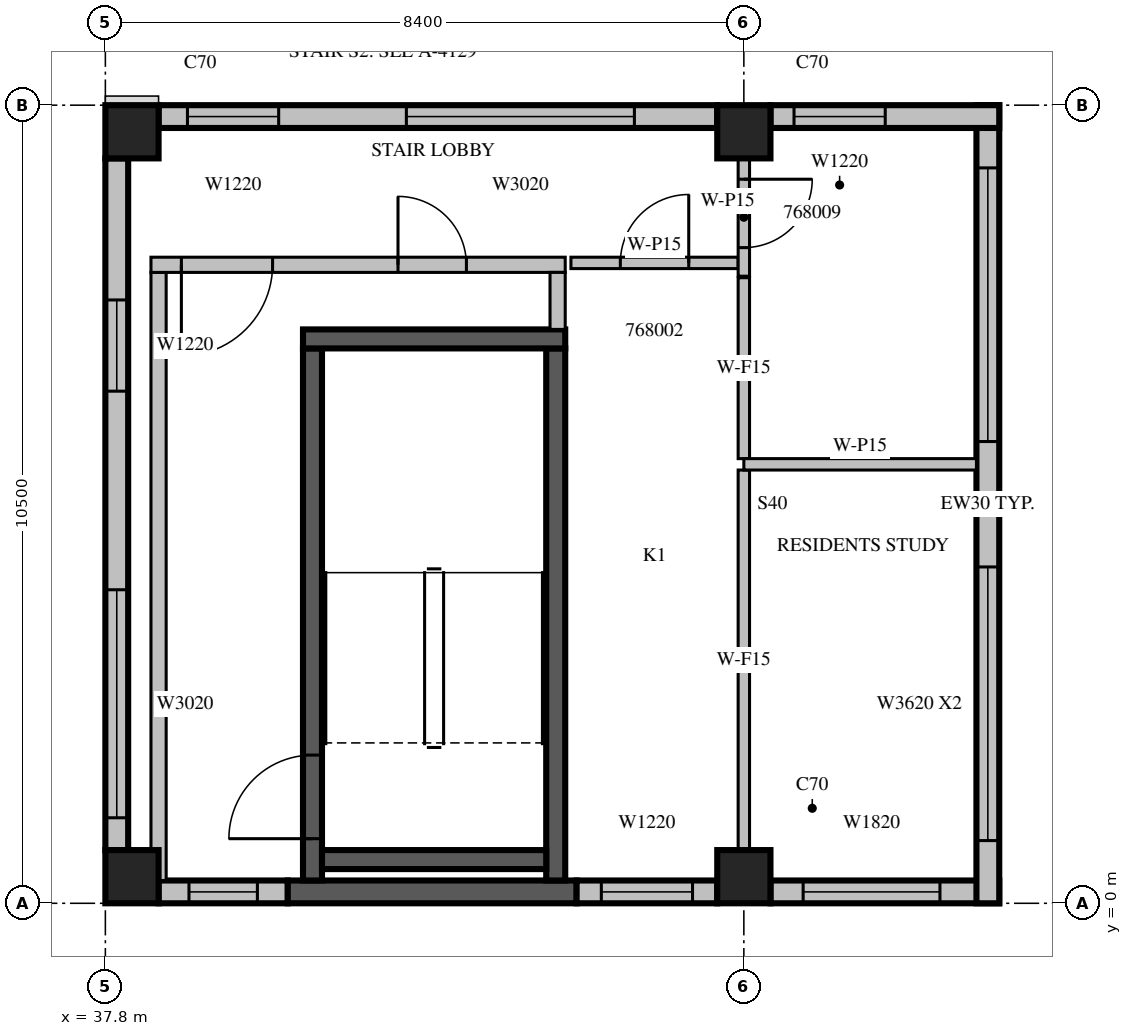
"""IFC4 building model, lengths in metres.
Left out: names, types, materials, properties, quantities, classifications, styles, units other than length and angle.
Written with IfcOpenShell. Run it as: python <this file> out.ifc"""

import sys

from ifc_helpers import new_model, si_unit, direction, frame, frame_2d, origin, origin_2d, place, context, subcontext, project, spatial, rectangle, extrude, source, transform, mapped, element, fill, save


model = new_model("IFC4")
c1 = context("Model", 3, precision=1e-05, world=origin(), true_north=direction((0.0, 1.0)))
c2 = subcontext(c1, "Body", "Model", "MODEL_VIEW")
j1 = project(units=[si_unit("LENGTHUNIT", "METRE"), si_unit("PLANEANGLEUNIT", "RADIAN")], contexts=[c1])
p1 = place(None, origin())
s1 = spatial("IfcSite", under=j1, at=p1, CompositionType="ELEMENT")
p2 = place(p1, origin())
s2 = spatial("IfcBuilding", under=s1, at=p2, CompositionType="ELEMENT")
p3 = place(p2, frame((0.0, 0.0, 298.5)))
s3 = spatial("IfcBuildingStorey", under=s2, at=p3, CompositionType="ELEMENT", Elevation=298.5)
m1 = source(origin(), c2, "Body", "SweptSolid", [
    extrude(rectangle(XDim=0.7, YDim=0.7, at=origin_2d()), origin(), (0.0, 0.0, 1.0), 3.5),
])
for number, where, z_axis, x_axis in (
    (1, (38.15, 0.35, 0.0), (0.0, 0.0, 1.0), (1.0, 0.0, 0.0)),
    (2, (46.2, 0.35, 0.0), (0.0, 0.0, 1.0), (1.0, 0.0, 0.0)),
    (3, (38.15, 10.15, 0.0), (0.0, 0.0, 1.0), (1.0, 0.0, 0.0)),
    (4, (46.2, 10.15, 0.0), (0.0, 0.0, 1.0), (1.0, 0.0, 0.0)),
):
    element("IfcColumn", number, at=place(p3, frame(where, z_axis=z_axis, x_axis=x_axis)), inside=s3, PredefinedType="COLUMN", context=c2, shape_type="MappedRepresentation", body=[
        mapped(m1, transform((0.0, 0.0, 0.0), scale=1.0)),
    ])
m2 = source(origin(), c2, "Body", "SweptSolid", [
    extrude(rectangle(XDim=1.7, YDim=0.3, at=frame_2d((0.85, 0.0))), origin(), (0.0, 0.0, 1.0), 3.1),
])
p4 = place(p3, frame((38.5, 0.15, 0.0), z_axis=(0.0, 0.0, 1.0), x_axis=(1.0, 0.0, 0.0)))
e5 = element("IfcWall", 5, at=p4, inside=s3, PredefinedType="STANDARD", context=c2, shape_type="MappedRepresentation", body=[
    mapped(m2, transform((0.0, 0.0, 0.0), scale=1.0)),
])
m3 = source(origin(), c2, "Body", "SweptSolid", [
    extrude(rectangle(XDim=0.9, YDim=2.0, at=frame_2d((0.45, 1.0))), frame((0.0, 0.16, 0.0), z_axis=(0.0, -1.0, 0.0), x_axis=(1.0, 0.0, 0.0)), (0.0, 0.0, 1.0), 0.32),
])
p5 = place(p4, frame((0.4, 0.0, 0.6)))
e6 = element("IfcOpeningElement", 6, at=p5, cuts=e5, PredefinedType="OPENING", context=c2, shape_type="MappedRepresentation", body=[
    mapped(m3, transform((0.0, 0.0, 0.0), scale=1.0)),
])
m4 = source(origin(), c2, "Body", "SweptSolid", [
    extrude(rectangle(XDim=3.8, YDim=0.3, at=frame_2d((1.9, 0.0))), origin(), (0.0, 0.0, 1.0), 3.1),
])
p6 = place(p3, frame((40.2, 0.15, 0.0), z_axis=(0.0, 0.0, 1.0), x_axis=(1.0, 0.0, 0.0)))
e7 = element("IfcWall", 7, at=p6, inside=s3, PredefinedType="SOLIDWALL", context=c2, shape_type="MappedRepresentation", body=[
    mapped(m4, transform((0.0, 0.0, 0.0), scale=1.0)),
])
m5 = source(origin(), c2, "Body", "SweptSolid", [
    extrude(rectangle(XDim=1.85, YDim=0.3, at=frame_2d((0.925, 0.0))), origin(), (0.0, 0.0, 1.0), 3.1),
])
p7 = place(p3, frame((44.0, 0.15, 0.0), z_axis=(0.0, 0.0, 1.0), x_axis=(1.0, 0.0, 0.0)))
e8 = element("IfcWall", 8, at=p7, inside=s3, PredefinedType="STANDARD", context=c2, shape_type="MappedRepresentation", body=[
    mapped(m5, transform((0.0, 0.0, 0.0), scale=1.0)),
])
m6 = source(origin(), c2, "Body", "SweptSolid", [
    extrude(rectangle(XDim=1.2, YDim=2.0, at=frame_2d((0.6, 1.0))), frame((0.0, 0.16, 0.0), z_axis=(0.0, -1.0, 0.0), x_axis=(1.0, 0.0, 0.0)), (0.0, 0.0, 1.0), 0.32),
])
p8 = place(p7, frame((0.325, 0.0, 0.6)))
e9 = element("IfcOpeningElement", 9, at=p8, cuts=e8, PredefinedType="OPENING", context=c2, shape_type="MappedRepresentation", body=[
    mapped(m6, transform((0.0, 0.0, 0.0), scale=1.0)),
])
m7 = source(origin(), c2, "Body", "SweptSolid", [
    extrude(rectangle(XDim=3.01, YDim=0.3, at=frame_2d((1.505, 0.0))), origin(), (0.0, 0.0, 1.0), 3.1),
])
p9 = place(p3, frame((46.55, 0.15, 0.0), z_axis=(0.0, 0.0, 1.0), x_axis=(1.0, 0.0, 0.0)))
e10 = element("IfcWall", 10, at=p9, inside=s3, PredefinedType="STANDARD", context=c2, shape_type="MappedRepresentation", body=[
    mapped(m7, transform((0.0, 0.0, 0.0), scale=1.0)),
])
m8 = source(origin(), c2, "Body", "SweptSolid", [
    extrude(rectangle(XDim=1.8, YDim=2.0, at=frame_2d((0.9, 1.0))), frame((0.0, 0.16, 0.0), z_axis=(0.0, -1.0, 0.0), x_axis=(1.0, 0.0, 0.0)), (0.0, 0.0, 1.0), 0.32),
])
p10 = place(p9, frame((0.43, 0.0, 0.6)))
e11 = element("IfcOpeningElement", 11, at=p10, cuts=e10, PredefinedType="OPENING", context=c2, shape_type="MappedRepresentation", body=[
    mapped(m8, transform((0.0, 0.0, 0.0), scale=1.0)),
])
m9 = source(origin(), c2, "Body", "SweptSolid", [
    extrude(rectangle(XDim=10.5, YDim=0.3, at=frame_2d((5.25, 0.0))), origin(), (0.0, 0.0, 1.0), 3.1),
])
p11 = place(p3, frame((49.41, 0.0, 0.0), z_axis=(0.0, 0.0, 1.0), x_axis=(0.0, 1.0, 0.0)))
e12 = element("IfcWall", 12, at=p11, inside=s3, PredefinedType="STANDARD", context=c2, shape_type="MappedRepresentation", body=[
    mapped(m9, transform((0.0, 0.0, 0.0), scale=1.0)),
])
m10 = source(origin(), c2, "Body", "SweptSolid", [
    extrude(rectangle(XDim=3.6, YDim=2.0, at=frame_2d((1.8, 1.0))), frame((0.0, 0.16, 0.0), z_axis=(0.0, -1.0, 0.0), x_axis=(1.0, 0.0, 0.0)), (0.0, 0.0, 1.0), 0.32),
])
p12 = place(p11, frame((0.825, 0.0, 0.6)))
e13 = element("IfcOpeningElement", 13, at=p12, cuts=e12, PredefinedType="OPENING", context=c2, shape_type="MappedRepresentation", body=[
    mapped(m10, transform((0.0, 0.0, 0.0), scale=1.0)),
])
p13 = place(p11, frame((6.075, 0.0, 0.6)))
e14 = element("IfcOpeningElement", 14, at=p13, cuts=e12, PredefinedType="OPENING", context=c2, shape_type="MappedRepresentation", body=[
    mapped(m10, transform((0.0, 0.0, 0.0), scale=1.0)),
])
p14 = place(p3, frame((49.56, 10.35, 0.0), z_axis=(0.0, 0.0, 1.0), x_axis=(-1.0, 0.0, 0.0)))
e15 = element("IfcWall", 15, at=p14, inside=s3, PredefinedType="STANDARD", context=c2, shape_type="MappedRepresentation", body=[
    mapped(m7, transform((0.0, 0.0, 0.0), scale=1.0)),
])
p15 = place(p14, frame((1.5, 0.0, 0.6)))
e16 = element("IfcOpeningElement", 16, at=p15, cuts=e15, PredefinedType="OPENING", context=c2, shape_type="MappedRepresentation", body=[
    mapped(m6, transform((0.0, 0.0, 0.0), scale=1.0)),
])
m11 = source(origin(), c2, "Body", "SweptSolid", [
    extrude(rectangle(XDim=7.35, YDim=0.3, at=frame_2d((3.675, 0.0))), origin(), (0.0, 0.0, 1.0), 3.1),
])
p16 = place(p3, frame((45.85, 10.35, 0.0), z_axis=(0.0, 0.0, 1.0), x_axis=(-1.0, 0.0, 0.0)))
e17 = element("IfcWall", 17, at=p16, inside=s3, PredefinedType="STANDARD", context=c2, shape_type="MappedRepresentation", body=[
    mapped(m11, transform((0.0, 0.0, 0.0), scale=1.0)),
])
m12 = source(origin(), c2, "Body", "SweptSolid", [
    extrude(rectangle(XDim=3.0, YDim=2.0, at=frame_2d((1.5, 1.0))), frame((0.0, 0.16, 0.0), z_axis=(0.0, -1.0, 0.0), x_axis=(1.0, 0.0, 0.0)), (0.0, 0.0, 1.0), 0.32),
])
p17 = place(p16, frame((1.09, 0.0, 0.6)))
e18 = element("IfcOpeningElement", 18, at=p17, cuts=e17, PredefinedType="OPENING", context=c2, shape_type="MappedRepresentation", body=[
    mapped(m12, transform((0.0, 0.0, 0.0), scale=1.0)),
])
p18 = place(p16, frame((5.77, 0.0, 0.6)))
e19 = element("IfcOpeningElement", 19, at=p18, cuts=e17, PredefinedType="OPENING", context=c2, shape_type="MappedRepresentation", body=[
    mapped(m6, transform((0.0, 0.0, 0.0), scale=1.0)),
])
m13 = source(origin(), c2, "Body", "SweptSolid", [
    extrude(rectangle(XDim=9.1, YDim=0.3, at=frame_2d((4.55, 0.0))), origin(), (0.0, 0.0, 1.0), 3.1),
])
p19 = place(p3, frame((37.95, 9.8, 0.0), z_axis=(0.0, 0.0, 1.0), x_axis=(0.0, -1.0, 0.0)))
e20 = element("IfcWall", 20, at=p19, inside=s3, PredefinedType="STANDARD", context=c2, shape_type="MappedRepresentation", body=[
    mapped(m13, transform((0.0, 0.0, 0.0), scale=1.0)),
])
p20 = place(p19, frame((1.863, 0.0, 0.6)))
e21 = element("IfcOpeningElement", 21, at=p20, cuts=e20, PredefinedType="OPENING", context=c2, shape_type="MappedRepresentation", body=[
    mapped(m6, transform((0.0, 0.0, 0.0), scale=1.0)),
])
p21 = place(p19, frame((5.675, 0.0, 0.6)))
e22 = element("IfcOpeningElement", 22, at=p21, cuts=e20, PredefinedType="OPENING", context=c2, shape_type="MappedRepresentation", body=[
    mapped(m12, transform((0.0, 0.0, 0.0), scale=1.0)),
])
m14 = source(origin(), c2, "Body", "SweptSolid", [
    extrude(rectangle(XDim=7.0, YDim=0.25, at=frame_2d((3.5, 0.0))), origin(), (0.0, 0.0, 1.0), 3.1),
])
p22 = place(p3, frame((40.525, 0.3, 0.0), z_axis=(0.0, 0.0, 1.0), x_axis=(0.0, 1.0, 0.0)))
e23 = element("IfcWall", 23, at=p22, inside=s3, PredefinedType="SOLIDWALL", context=c2, shape_type="MappedRepresentation", body=[
    mapped(m14, transform((0.0, 0.0, 0.0), scale=1.0)),
])
m15 = source(origin(), c2, "Body", "SweptSolid", [
    extrude(rectangle(XDim=1.1, YDim=2.1, at=frame_2d((0.55, 1.05))), frame((0.0, 0.135, 0.0), z_axis=(0.0, -1.0, 0.0), x_axis=(1.0, 0.0, 0.0)), (0.0, 0.0, 1.0), 0.27),
])
p23 = place(p22, frame((0.55, 0.0, 0.0)))
e24 = element("IfcOpeningElement", 24, at=p23, cuts=e23, PredefinedType="OPENING", context=c2, shape_type="MappedRepresentation", body=[
    mapped(m15, transform((0.0, 0.0, 0.0), scale=1.0)),
])
p24 = place(p3, frame((43.725, 0.3, 0.0), z_axis=(0.0, 0.0, 1.0), x_axis=(0.0, 1.0, 0.0)))
e25 = element("IfcWall", 25, at=p24, inside=s3, PredefinedType="SOLIDWALL", context=c2, shape_type="MappedRepresentation", body=[
    mapped(m14, transform((0.0, 0.0, 0.0), scale=1.0)),
])
m16 = source(origin(), c2, "Body", "SweptSolid", [
    extrude(rectangle(XDim=3.45, YDim=0.25, at=frame_2d((1.725, 0.0))), origin(), (0.0, 0.0, 1.0), 3.1),
])
p25 = place(p3, frame((40.4, 7.425, 0.0), z_axis=(0.0, 0.0, 1.0), x_axis=(1.0, 0.0, 0.0)))
e26 = element("IfcWall", 26, at=p25, inside=s3, PredefinedType="SOLIDWALL", context=c2, shape_type="MappedRepresentation", body=[
    mapped(m16, transform((0.0, 0.0, 0.0), scale=1.0)),
])
m17 = source(origin(), c2, "Body", "SweptSolid", [
    extrude(rectangle(XDim=2.95, YDim=0.25, at=frame_2d((1.475, 0.0))), origin(), (0.0, 0.0, 1.0), 3.1),
])
p26 = place(p3, frame((40.65, 0.575, 0.0), z_axis=(0.0, 0.0, 1.0), x_axis=(1.0, 0.0, 0.0)))
e27 = element("IfcWall", 27, at=p26, inside=s3, PredefinedType="SOLIDWALL", context=c2, shape_type="MappedRepresentation", body=[
    mapped(m17, transform((0.0, 0.0, 0.0), scale=1.0)),
])
m18 = source(origin(), c2, "Body", "SweptSolid", [
    extrude(rectangle(XDim=8.0, YDim=0.2, at=frame_2d((4.0, 0.0))), origin(), (0.0, 0.0, 1.0), 3.1),
])
p27 = place(p3, frame((38.5, 0.3, 0.0), z_axis=(0.0, 0.0, 1.0), x_axis=(0.0, 1.0, 0.0)))
e28 = element("IfcWall", 28, at=p27, inside=s3, PredefinedType="PARTITIONING", context=c2, shape_type="MappedRepresentation", body=[
    mapped(m18, transform((0.0, 0.0, 0.0), scale=1.0)),
])
m19 = source(origin(), c2, "Body", "SweptSolid", [
    extrude(rectangle(XDim=5.45, YDim=0.2, at=frame_2d((2.725, 0.0))), origin(), (0.0, 0.0, 1.0), 3.1),
])
p28 = place(p3, frame((38.4, 8.4, 0.0), z_axis=(0.0, 0.0, 1.0), x_axis=(1.0, 0.0, 0.0)))
e29 = element("IfcWall", 29, at=p28, inside=s3, PredefinedType="PARTITIONING", context=c2, shape_type="MappedRepresentation", body=[
    mapped(m19, transform((0.0, 0.0, 0.0), scale=1.0)),
])
m20 = source(origin(), c2, "Body", "SweptSolid", [
    extrude(rectangle(XDim=1.2, YDim=2.1, at=frame_2d((0.6, 1.05))), frame((0.0, 0.11, 0.0), z_axis=(0.0, -1.0, 0.0), x_axis=(1.0, 0.0, 0.0)), (0.0, 0.0, 1.0), 0.22),
])
p29 = place(p28, frame((0.4, 0.0, 0.0)))
e30 = element("IfcOpeningElement", 30, at=p29, cuts=e29, PredefinedType="OPENING", context=c2, shape_type="MappedRepresentation", body=[
    mapped(m20, transform((0.0, 0.0, 0.0), scale=1.0)),
])
m21 = source(origin(), c2, "Body", "SweptSolid", [
    extrude(rectangle(XDim=0.9, YDim=2.1, at=frame_2d((0.45, 1.05))), frame((0.0, 0.11, 0.0), z_axis=(0.0, -1.0, 0.0), x_axis=(1.0, 0.0, 0.0)), (0.0, 0.0, 1.0), 0.22),
])
p30 = place(p28, frame((3.25, 0.0, 0.0)))
e31 = element("IfcOpeningElement", 31, at=p30, cuts=e29, PredefinedType="OPENING", context=c2, shape_type="MappedRepresentation", body=[
    mapped(m21, transform((0.0, 0.0, 0.0), scale=1.0)),
])
m22 = source(origin(), c2, "Body", "SweptSolid", [
    extrude(rectangle(XDim=0.75, YDim=0.2, at=frame_2d((0.375, 0.0))), origin(), (0.0, 0.0, 1.0), 3.1),
])
p31 = place(p3, frame((43.75, 7.55, 0.0), z_axis=(0.0, 0.0, 1.0), x_axis=(0.0, 1.0, 0.0)))
e32 = element("IfcWall", 32, at=p31, inside=s3, PredefinedType="PARTITIONING", context=c2, shape_type="MappedRepresentation", body=[
    mapped(m22, transform((0.0, 0.0, 0.0), scale=1.0)),
])
m23 = source(origin(), c2, "Body", "SweptSolid", [
    extrude(rectangle(XDim=2.2, YDim=0.15, at=frame_2d((1.1, 0.0))), origin(), (0.0, 0.0, 1.0), 3.1),
])
p32 = place(p3, frame((46.125, 8.425, 0.0), z_axis=(0.0, 0.0, 1.0), x_axis=(-1.0, 0.0, 0.0)))
e33 = element("IfcWall", 33, at=p32, inside=s3, PredefinedType="PARTITIONING", context=c2, shape_type="MappedRepresentation", body=[
    mapped(m23, transform((0.0, 0.0, 0.0), scale=1.0)),
])
m24 = source(origin(), c2, "Body", "SweptSolid", [
    extrude(rectangle(XDim=0.9, YDim=2.1, at=frame_2d((0.45, 1.05))), frame((0.0, 0.085, 0.0), z_axis=(0.0, -1.0, 0.0), x_axis=(1.0, 0.0, 0.0)), (0.0, 0.0, 1.0), 0.17),
])
p33 = place(p32, frame((0.65, 0.0, 0.0)))
e34 = element("IfcOpeningElement", 34, at=p33, cuts=e33, PredefinedType="OPENING", context=c2, shape_type="MappedRepresentation", body=[
    mapped(m24, transform((0.0, 0.0, 0.0), scale=1.0)),
])
m25 = source(origin(), c2, "Body", "SweptSolid", [
    extrude(rectangle(XDim=1.551, YDim=0.15, at=frame_2d((0.775, 0.0))), origin(), (0.0, 0.0, 1.0), 3.1),
])
p34 = place(p3, frame((46.2, 9.801, 0.0), z_axis=(0.0, 0.0, 1.0), x_axis=(0.0, -1.0, 0.0)))
e35 = element("IfcWall", 35, at=p34, inside=s3, PredefinedType="PARTITIONING", context=c2, shape_type="MappedRepresentation", body=[
    mapped(m25, transform((0.0, 0.0, 0.0), scale=1.0)),
])
p35 = place(p34, frame((0.275, 0.0, 0.0)))
e36 = element("IfcOpeningElement", 36, at=p35, cuts=e35, PredefinedType="OPENING", context=c2, shape_type="MappedRepresentation", body=[
    mapped(m24, transform((0.0, 0.0, 0.0), scale=1.0)),
])
m26 = source(origin(), c2, "Body", "SweptSolid", [
    extrude(rectangle(XDim=5.001, YDim=0.15, at=frame_2d((2.501, 0.0))), origin(), (0.0, 0.0, 1.0), 3.1),
])
p36 = place(p3, frame((46.2, 0.699, 0.0), z_axis=(0.0, 0.0, 1.0), x_axis=(0.0, 1.0, 0.0)))
e37 = element("IfcWall", 37, at=p36, inside=s3, PredefinedType="PARTITIONING", context=c2, shape_type="MappedRepresentation", body=[
    mapped(m26, transform((0.0, 0.0, 0.0), scale=1.0)),
])
m27 = source(origin(), c2, "Body", "SweptSolid", [
    extrude(rectangle(XDim=2.38, YDim=0.15, at=frame_2d((1.19, 0.0))), origin(), (0.0, 0.0, 1.0), 3.1),
])
p37 = place(p3, frame((46.2, 5.85, 0.0), z_axis=(0.0, 0.0, 1.0), x_axis=(0.0, 1.0, 0.0)))
e38 = element("IfcWall", 38, at=p37, inside=s3, PredefinedType="PARTITIONING", context=c2, shape_type="MappedRepresentation", body=[
    mapped(m27, transform((0.0, 0.0, 0.0), scale=1.0)),
])
m28 = source(origin(), c2, "Body", "SweptSolid", [
    extrude(rectangle(XDim=3.06, YDim=0.15, at=frame_2d((1.53, 0.0))), origin(), (0.0, 0.0, 1.0), 3.1),
])
p38 = place(p3, frame((49.26, 5.775, 0.0), z_axis=(0.0, 0.0, 1.0), x_axis=(-1.0, 0.0, 0.0)))
e39 = element("IfcWall", 39, at=p38, inside=s3, PredefinedType="PARTITIONING", context=c2, shape_type="MappedRepresentation", body=[
    mapped(m28, transform((0.0, 0.0, 0.0), scale=1.0)),
])
m29 = source(origin(), c2, "Body", "SweptSolid", [
    extrude(rectangle(XDim=0.9, YDim=2.0, at=frame_2d((0.45, 1.0))), frame((0.0, 0.03, 0.0), z_axis=(0.0, -1.0, 0.0), x_axis=(1.0, 0.0, 0.0)), (0.0, 0.0, 1.0), 0.06),
])
p39 = place(p5, origin())
e40 = element("IfcWindow", 40, at=p39, inside=s3, PartitioningType="SINGLE_PANEL", PredefinedType="WINDOW", context=c2, shape_type="MappedRepresentation", body=[
    mapped(m29, transform((0.0, 0.0, 0.0), scale=1.0)),
])
fill(e6, e40)
m30 = source(origin(), c2, "Body", "SweptSolid", [
    extrude(rectangle(XDim=1.2, YDim=2.0, at=frame_2d((0.6, 1.0))), frame((0.0, 0.03, 0.0), z_axis=(0.0, -1.0, 0.0), x_axis=(1.0, 0.0, 0.0)), (0.0, 0.0, 1.0), 0.06),
])
p40 = place(p8, origin())
e41 = element("IfcWindow", 41, at=p40, inside=s3, PartitioningType="SINGLE_PANEL", PredefinedType="WINDOW", context=c2, shape_type="MappedRepresentation", body=[
    mapped(m30, transform((0.0, 0.0, 0.0), scale=1.0)),
])
fill(e9, e41)
m31 = source(origin(), c2, "Body", "SweptSolid", [
    extrude(rectangle(XDim=1.8, YDim=2.0, at=frame_2d((0.9, 1.0))), frame((0.0, 0.03, 0.0), z_axis=(0.0, -1.0, 0.0), x_axis=(1.0, 0.0, 0.0)), (0.0, 0.0, 1.0), 0.06),
])
p41 = place(p10, origin())
e42 = element("IfcWindow", 42, at=p41, inside=s3, PartitioningType="SINGLE_PANEL", PredefinedType="WINDOW", context=c2, shape_type="MappedRepresentation", body=[
    mapped(m31, transform((0.0, 0.0, 0.0), scale=1.0)),
])
fill(e11, e42)
m32 = source(origin(), c2, "Body", "SweptSolid", [
    extrude(rectangle(XDim=3.6, YDim=2.0, at=frame_2d((1.8, 1.0))), frame((0.0, 0.03, 0.0), z_axis=(0.0, -1.0, 0.0), x_axis=(1.0, 0.0, 0.0)), (0.0, 0.0, 1.0), 0.06),
])
p42 = place(p12, origin())
e43 = element("IfcWindow", 43, at=p42, inside=s3, PartitioningType="SINGLE_PANEL", PredefinedType="WINDOW", context=c2, shape_type="MappedRepresentation", body=[
    mapped(m32, transform((0.0, 0.0, 0.0), scale=1.0)),
])
fill(e13, e43)
p43 = place(p13, origin())
e44 = element("IfcWindow", 44, at=p43, inside=s3, PartitioningType="SINGLE_PANEL", PredefinedType="WINDOW", context=c2, shape_type="MappedRepresentation", body=[
    mapped(m32, transform((0.0, 0.0, 0.0), scale=1.0)),
])
fill(e14, e44)
p44 = place(p15, origin())
e45 = element("IfcWindow", 45, at=p44, inside=s3, PartitioningType="SINGLE_PANEL", PredefinedType="WINDOW", context=c2, shape_type="MappedRepresentation", body=[
    mapped(m30, transform((0.0, 0.0, 0.0), scale=1.0)),
])
fill(e16, e45)
m33 = source(origin(), c2, "Body", "SweptSolid", [
    extrude(rectangle(XDim=3.0, YDim=2.0, at=frame_2d((1.5, 1.0))), frame((0.0, 0.03, 0.0), z_axis=(0.0, -1.0, 0.0), x_axis=(1.0, 0.0, 0.0)), (0.0, 0.0, 1.0), 0.06),
])
p45 = place(p17, origin())
e46 = element("IfcWindow", 46, at=p45, inside=s3, PartitioningType="SINGLE_PANEL", PredefinedType="WINDOW", context=c2, shape_type="MappedRepresentation", body=[
    mapped(m33, transform((0.0, 0.0, 0.0), scale=1.0)),
])
fill(e18, e46)
p46 = place(p18, origin())
e47 = element("IfcWindow", 47, at=p46, inside=s3, PartitioningType="SINGLE_PANEL", PredefinedType="WINDOW", context=c2, shape_type="MappedRepresentation", body=[
    mapped(m30, transform((0.0, 0.0, 0.0), scale=1.0)),
])
fill(e19, e47)
p47 = place(p20, origin())
e48 = element("IfcWindow", 48, at=p47, inside=s3, PartitioningType="SINGLE_PANEL", PredefinedType="WINDOW", context=c2, shape_type="MappedRepresentation", body=[
    mapped(m30, transform((0.0, 0.0, 0.0), scale=1.0)),
])
fill(e21, e48)
p48 = place(p21, origin())
e49 = element("IfcWindow", 49, at=p48, inside=s3, PartitioningType="SINGLE_PANEL", PredefinedType="WINDOW", context=c2, shape_type="MappedRepresentation", body=[
    mapped(m33, transform((0.0, 0.0, 0.0), scale=1.0)),
])
fill(e22, e49)
m34 = source(origin(), c2, "Body", "SweptSolid", [
    extrude(rectangle(XDim=1.1, YDim=2.1, at=frame_2d((0.55, 1.05))), frame((0.0, 0.025, 0.0), z_axis=(0.0, -1.0, 0.0), x_axis=(1.0, 0.0, 0.0)), (0.0, 0.0, 1.0), 0.05),
])
p49 = place(p23, origin())
e50 = element("IfcDoor", 50, at=p49, inside=s3, OperationType="SINGLE_SWING_LEFT", PredefinedType="DOOR", context=c2, shape_type="MappedRepresentation", body=[
    mapped(m34, transform((0.0, 0.0, 0.0), scale=1.0)),
])
fill(e24, e50)
m35 = source(origin(), c2, "Body", "SweptSolid", [
    extrude(rectangle(XDim=1.2, YDim=2.1, at=frame_2d((0.6, 1.05))), frame((0.0, 0.025, 0.0), z_axis=(0.0, -1.0, 0.0), x_axis=(1.0, 0.0, 0.0)), (0.0, 0.0, 1.0), 0.05),
])
p50 = place(p29, origin())
e51 = element("IfcDoor", 51, at=p50, inside=s3, OperationType="SINGLE_SWING_RIGHT", PredefinedType="DOOR", context=c2, shape_type="MappedRepresentation", body=[
    mapped(m35, transform((0.0, 0.0, 0.0), scale=1.0)),
])
fill(e30, e51)
m36 = source(origin(), c2, "Body", "SweptSolid", [
    extrude(rectangle(XDim=0.9, YDim=2.1, at=frame_2d((0.45, 1.05))), frame((0.0, 0.025, 0.0), z_axis=(0.0, -1.0, 0.0), x_axis=(1.0, 0.0, 0.0)), (0.0, 0.0, 1.0), 0.05),
])
p51 = place(p30, origin())
e52 = element("IfcDoor", 52, at=p51, inside=s3, OperationType="SINGLE_SWING_LEFT", PredefinedType="DOOR", context=c2, shape_type="MappedRepresentation", body=[
    mapped(m36, transform((0.0, 0.0, 0.0), scale=1.0)),
])
fill(e31, e52)
p52 = place(p33, origin())
e53 = element("IfcDoor", 53, at=p52, inside=s3, OperationType="SINGLE_SWING_RIGHT", PredefinedType="DOOR", context=c2, shape_type="MappedRepresentation", body=[
    mapped(m36, transform((0.0, 0.0, 0.0), scale=1.0)),
])
fill(e34, e53)
p53 = place(p35, origin())
e54 = element("IfcDoor", 54, at=p53, inside=s3, OperationType="SINGLE_SWING_LEFT", PredefinedType="DOOR", context=c2, shape_type="MappedRepresentation", body=[
    mapped(m36, transform((0.0, 0.0, 0.0), scale=1.0)),
])
fill(e36, e54)
save(model, sys.argv[1])
